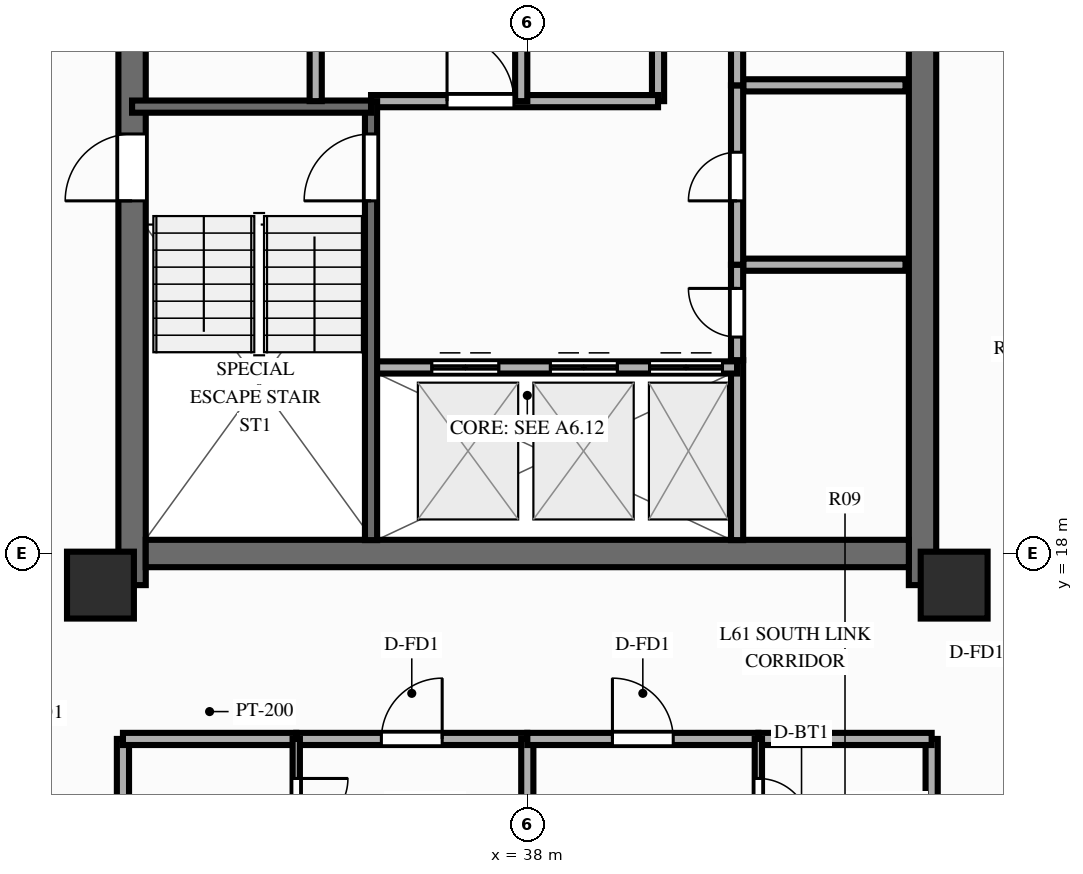
"""IFC4 building model, lengths in metres.
Left out: names, types, materials, properties, quantities, classifications, styles, units other than length and angle.
Written with IfcOpenShell. Run it as: python <this file> out.ifc"""

import sys

from ifc_helpers import new_model, si_unit, direction, frame, frame_2d, origin, origin_2d, place, context, subcontext, project, spatial, rectangle, extrude, source, transform, mapped, element, fill, save


model = new_model("IFC4")
c1 = context("Model", 3, precision=1e-05, world=origin(), true_north=direction((0.0, 1.0)))
c2 = subcontext(c1, "Body", "Model", "MODEL_VIEW")
j1 = project(units=[si_unit("LENGTHUNIT", "METRE"), si_unit("PLANEANGLEUNIT", "RADIAN")], contexts=[c1])
p1 = place(None, origin())
s1 = spatial("IfcSite", under=j1, at=p1, CompositionType="ELEMENT")
p2 = place(p1, origin())
s2 = spatial("IfcBuilding", under=s1, at=p2, CompositionType="ELEMENT")
p3 = place(p2, frame((0.0, 0.0, 196.6)))
s3 = spatial("IfcBuildingStorey", under=s2, at=p3, CompositionType="ELEMENT", Elevation=196.6)
p4 = place(p3, frame((31.5, 17.48, 0.0), z_axis=(0.0, 0.0, 1.0), x_axis=(0.0, 1.0, 0.0)))
e1 = element("IfcWall", 1, at=p4, inside=s3, PredefinedType="SHEAR", context=c2, shape_type="SweptSolid", body=[
    extrude(rectangle(XDim=19.04, YDim=0.45, at=frame_2d((9.52, 0.0))), origin(), (0.0, 0.0, 1.0), 3.0),
])
p5 = place(p4, frame((6.32, 0.0, 0.0)))
e2 = element("IfcOpeningElement", 2, at=p5, cuts=e1, PredefinedType="OPENING", context=c2, shape_type="SweptSolid", body=[
    extrude(rectangle(XDim=1.1, YDim=2.15, at=frame_2d((0.55, 1.075))), frame((0.0, 0.237, 0.0), z_axis=(0.0, -1.0, 0.0), x_axis=(1.0, 0.0, 0.0)), (0.0, 0.0, 1.0), 0.474),
])
p6 = place(p3, frame((44.5, 17.48, 0.0), z_axis=(0.0, 0.0, 1.0), x_axis=(0.0, 1.0, 0.0)))
e3 = element("IfcWall", 3, at=p6, inside=s3, PredefinedType="SHEAR", context=c2, shape_type="SweptSolid", body=[
    extrude(rectangle(XDim=19.04, YDim=0.45, at=frame_2d((9.52, 0.0))), origin(), (0.0, 0.0, 1.0), 3.0),
])
p7 = place(p6, frame((12.67, 0.0, 0.0), z_axis=(0.0, 0.0, 1.0), x_axis=(-1.0, 0.0, 0.0)))
e4 = element("IfcOpeningElement", 4, at=p7, cuts=e3, PredefinedType="OPENING", context=c2, shape_type="SweptSolid", body=[
    extrude(rectangle(XDim=1.1, YDim=2.15, at=frame_2d((0.55, 1.075))), frame((0.0, 0.237, 0.0), z_axis=(0.0, -1.0, 0.0), x_axis=(1.0, 0.0, 0.0)), (0.0, 0.0, 1.0), 0.474),
])
p8 = place(p3, frame((31.725, 18.0, 0.0), z_axis=(0.0, 0.0, 1.0), x_axis=(1.0, 0.0, 0.0)))
e5 = element("IfcWall", 5, at=p8, inside=s3, PredefinedType="SHEAR", context=c2, shape_type="SweptSolid", body=[
    extrude(rectangle(XDim=12.55, YDim=0.45, at=frame_2d((6.275, 0.0))), origin(), (0.0, 0.0, 1.0), 3.0),
])
m1 = source(origin(), c2, "Body", "SweptSolid", [
    extrude(rectangle(XDim=1.1, YDim=1.1, at=origin_2d()), origin(), (0.0, 0.0, 1.0), 3.0),
])
for number, where, z_axis, x_axis in (
    (6, (30.98, 17.48, 0.0), (0.0, 0.0, 1.0), (1.0, 0.0, 0.0)),
    (7, (45.02, 17.48, 0.0), (0.0, 0.0, 1.0), (1.0, 0.0, 0.0)),
):
    element("IfcColumn", number, at=place(p3, frame(where, z_axis=z_axis, x_axis=x_axis)), inside=s3, PredefinedType="COLUMN", context=c2, shape_type="MappedRepresentation", body=[
        mapped(m1, transform((0.0, 0.0, 0.0), scale=1.0)),
    ])
p9 = place(p3, frame((41.55, 22.75, 0.0), z_axis=(0.0, 0.0, 1.0), x_axis=(1.0, 0.0, 0.0)))
e8 = element("IfcWall", 8, at=p9, inside=s3, PredefinedType="PARTITIONING", context=c2, shape_type="SweptSolid", body=[
    extrude(rectangle(XDim=2.67, YDim=0.2, at=frame_2d((1.335, 0.0))), origin(), (0.0, 0.0, 1.0), 2.79),
])
p10 = place(p3, frame((41.55, 25.7, 0.0), z_axis=(0.0, 0.0, 1.0), x_axis=(1.0, 0.0, 0.0)))
e9 = element("IfcWall", 9, at=p10, inside=s3, PredefinedType="PARTITIONING", context=c2, shape_type="SweptSolid", body=[
    extrude(rectangle(XDim=2.67, YDim=0.2, at=frame_2d((1.335, 0.0))), origin(), (0.0, 0.0, 1.0), 2.14),
])
p11 = place(p3, frame((41.45, 18.22, 0.0), z_axis=(0.0, 0.0, 1.0), x_axis=(0.0, 1.0, 0.0)))
e10 = element("IfcWall", 10, at=p11, inside=s3, PredefinedType="PARTITIONING", context=c2, shape_type="SweptSolid", body=[
    extrude(rectangle(XDim=2.96, YDim=0.2, at=frame_2d((1.48, 0.0))), origin(), (0.0, 0.0, 1.0), 2.79),
])
p12 = place(p3, frame((41.45, 21.18, 0.0), z_axis=(0.0, 0.0, 1.0), x_axis=(0.0, 1.0, 0.0)))
e11 = element("IfcWall", 11, at=p12, inside=s3, PredefinedType="PARTITIONING", context=c2, shape_type="SweptSolid", body=[
    extrude(rectangle(XDim=1.57, YDim=0.2, at=frame_2d((0.785, 0.0))), origin(), (0.0, 0.0, 1.0), 2.79),
])
p13 = place(p12, frame((0.38, 0.0, 0.0)))
e12 = element("IfcOpeningElement", 12, at=p13, cuts=e11, PredefinedType="OPENING", context=c2, shape_type="SweptSolid", body=[
    extrude(rectangle(XDim=0.8, YDim=2.05, at=frame_2d((0.4, 1.025))), frame((0.0, 0.112, 0.0), z_axis=(0.0, -1.0, 0.0), x_axis=(1.0, 0.0, 0.0)), (0.0, 0.0, 1.0), 0.224),
])
p14 = place(p3, frame((41.45, 22.75, 0.0), z_axis=(0.0, 0.0, 1.0), x_axis=(0.0, 1.0, 0.0)))
e13 = element("IfcWall", 13, at=p14, inside=s3, PredefinedType="PARTITIONING", context=c2, shape_type="SweptSolid", body=[
    extrude(rectangle(XDim=2.95, YDim=0.2, at=frame_2d((1.475, 0.0))), origin(), (0.0, 0.0, 1.0), 2.79),
])
p15 = place(p14, frame((1.05, 0.0, 0.0)))
e14 = element("IfcOpeningElement", 14, at=p15, cuts=e13, PredefinedType="OPENING", context=c2, shape_type="SweptSolid", body=[
    extrude(rectangle(XDim=0.8, YDim=2.05, at=frame_2d((0.4, 1.025))), frame((0.0, 0.112, 0.0), z_axis=(0.0, -1.0, 0.0), x_axis=(1.0, 0.0, 0.0)), (0.0, 0.0, 1.0), 0.224),
])
p16 = place(p3, frame((41.45, 25.7, 0.0), z_axis=(0.0, 0.0, 1.0), x_axis=(0.0, 1.0, 0.0)))
e15 = element("IfcWall", 15, at=p16, inside=s3, PredefinedType="PARTITIONING", context=c2, shape_type="SweptSolid", body=[
    extrude(rectangle(XDim=2.9, YDim=0.2, at=frame_2d((1.45, 0.0))), origin(), (0.0, 0.0, 1.0), 2.79),
])
p17 = place(p16, frame((1.0, 0.0, 0.0)))
e16 = element("IfcOpeningElement", 16, at=p17, cuts=e15, PredefinedType="OPENING", context=c2, shape_type="SweptSolid", body=[
    extrude(rectangle(XDim=0.9, YDim=2.1, at=frame_2d((0.45, 1.05))), frame((0.0, 0.112, 0.0), z_axis=(0.0, -1.0, 0.0), x_axis=(1.0, 0.0, 0.0)), (0.0, 0.0, 1.0), 0.224),
])
p18 = place(p3, frame((40.15, 25.44, 0.0), z_axis=(0.0, 0.0, 1.0), x_axis=(0.0, 1.0, 0.0)))
e17 = element("IfcWall", 17, at=p18, inside=s3, PredefinedType="PARTITIONING", context=c2, shape_type="SweptSolid", body=[
    extrude(rectangle(XDim=6.36, YDim=0.2, at=frame_2d((3.18, 0.0))), origin(), (0.0, 0.0, 1.0), 2.79),
])
p19 = place(p3, frame((35.43, 21.06, 0.0), z_axis=(0.0, 0.0, 1.0), x_axis=(1.0, 0.0, 0.0)))
e18 = element("IfcWall", 18, at=p19, inside=s3, PredefinedType="PARTITIONING", context=c2, shape_type="SweptSolid", body=[
    extrude(rectangle(XDim=6.02, YDim=0.2, at=frame_2d((3.01, 0.0))), origin(), (0.0, 0.0, 1.0), 2.79),
])
p20 = place(p19, frame((1.0, 0.0, 0.0)))
e19 = element("IfcOpeningElement", 19, at=p20, cuts=e18, PredefinedType="OPENING", context=c2, shape_type="SweptSolid", body=[
    extrude(rectangle(XDim=1.1, YDim=2.15, at=frame_2d((0.55, 1.075))), frame((0.0, 0.112, 0.0), z_axis=(0.0, -1.0, 0.0), x_axis=(1.0, 0.0, 0.0)), (0.0, 0.0, 1.0), 0.224),
])
p21 = place(p19, frame((2.95, 0.0, 0.0)))
e20 = element("IfcOpeningElement", 20, at=p21, cuts=e18, PredefinedType="OPENING", context=c2, shape_type="SweptSolid", body=[
    extrude(rectangle(XDim=1.1, YDim=2.15, at=frame_2d((0.55, 1.075))), frame((0.0, 0.112, 0.0), z_axis=(0.0, -1.0, 0.0), x_axis=(1.0, 0.0, 0.0)), (0.0, 0.0, 1.0), 0.224),
])
p22 = place(p19, frame((4.58, 0.0, 0.0)))
e21 = element("IfcOpeningElement", 21, at=p22, cuts=e18, PredefinedType="OPENING", context=c2, shape_type="SweptSolid", body=[
    extrude(rectangle(XDim=1.2, YDim=2.15, at=frame_2d((0.6, 1.075))), frame((0.0, 0.112, 0.0), z_axis=(0.0, -1.0, 0.0), x_axis=(1.0, 0.0, 0.0)), (0.0, 0.0, 1.0), 0.224),
])
p23 = place(p3, frame((35.43, 25.44, 0.0), z_axis=(0.0, 0.0, 1.0), x_axis=(1.0, 0.0, 0.0)))
e22 = element("IfcWall", 22, at=p23, inside=s3, PredefinedType="PARTITIONING", context=c2, shape_type="SweptSolid", body=[
    extrude(rectangle(XDim=4.72, YDim=0.2, at=frame_2d((2.36, 0.0))), origin(), (0.0, 0.0, 1.0), 2.79),
])
p24 = place(p23, frame((1.25, 0.0, 0.0)))
e23 = element("IfcOpeningElement", 23, at=p24, cuts=e22, PredefinedType="OPENING", context=c2, shape_type="SweptSolid", body=[
    extrude(rectangle(XDim=1.1, YDim=2.15, at=frame_2d((0.55, 1.075))), frame((0.0, 0.112, 0.0), z_axis=(0.0, -1.0, 0.0), x_axis=(1.0, 0.0, 0.0)), (0.0, 0.0, 1.0), 0.224),
])
p25 = place(p3, frame((35.43, 18.22, 0.0), z_axis=(0.0, 0.0, 1.0), x_axis=(0.0, 1.0, 0.0)))
e24 = element("IfcWall", 24, at=p25, inside=s3, PredefinedType="SOLIDWALL", context=c2, shape_type="SweptSolid", body=[
    extrude(rectangle(XDim=7.22, YDim=0.2, at=frame_2d((3.61, 0.0))), origin(), (0.0, 0.0, 1.0), 2.79),
])
p26 = place(p25, frame((6.68, 0.0, 0.0), z_axis=(0.0, 0.0, 1.0), x_axis=(-1.0, 0.0, 0.0)))
e25 = element("IfcOpeningElement", 25, at=p26, cuts=e24, PredefinedType="OPENING", context=c2, shape_type="SweptSolid", body=[
    extrude(rectangle(XDim=1.1, YDim=2.15, at=frame_2d((0.55, 1.075))), frame((0.0, 0.112, 0.0), z_axis=(0.0, -1.0, 0.0), x_axis=(1.0, 0.0, 0.0)), (0.0, 0.0, 1.0), 0.224),
])
p27 = place(p3, frame((31.5, 25.35, 0.0), z_axis=(0.0, 0.0, 1.0), x_axis=(1.0, 0.0, 0.0)))
e26 = element("IfcWall", 26, at=p27, inside=s3, PredefinedType="SOLIDWALL", context=c2, shape_type="SweptSolid", body=[
    extrude(rectangle(XDim=3.93, YDim=0.2, at=frame_2d((1.965, 0.0))), origin(), (0.0, 0.0, 1.0), 2.79),
])
p28 = place(p3, frame((34.52, 25.44, 0.0), z_axis=(0.0, 0.0, 1.0), x_axis=(0.0, 1.0, 0.0)))
e27 = element("IfcWall", 27, at=p28, inside=s3, PredefinedType="PARTITIONING", context=c2, shape_type="SweptSolid", body=[
    extrude(rectangle(XDim=10.34, YDim=0.2, at=frame_2d((5.17, 0.0))), origin(), (0.0, 0.0, 1.0), 2.79),
])
p29 = place(p28, frame((1.15, 0.0, 0.0)))
e28 = element("IfcOpeningElement", 28, at=p29, cuts=e27, PredefinedType="OPENING", context=c2, shape_type="SweptSolid", body=[
    extrude(rectangle(XDim=0.9, YDim=2.1, at=frame_2d((0.45, 1.05))), frame((0.0, 0.112, 0.0), z_axis=(0.0, -1.0, 0.0), x_axis=(1.0, 0.0, 0.0)), (0.0, 0.0, 1.0), 0.224),
])
p30 = place(p28, frame((4.35, 0.0, 0.0)))
e29 = element("IfcOpeningElement", 29, at=p30, cuts=e27, PredefinedType="OPENING", context=c2, shape_type="SweptSolid", body=[
    extrude(rectangle(XDim=0.9, YDim=2.1, at=frame_2d((0.45, 1.05))), frame((0.0, 0.112, 0.0), z_axis=(0.0, -1.0, 0.0), x_axis=(1.0, 0.0, 0.0)), (0.0, 0.0, 1.0), 0.224),
])
p31 = place(p28, frame((7.01, 0.0, 0.0)))
e30 = element("IfcOpeningElement", 30, at=p31, cuts=e27, PredefinedType="OPENING", context=c2, shape_type="SweptSolid", body=[
    extrude(rectangle(XDim=1.0, YDim=2.15, at=frame_2d((0.5, 1.075))), frame((0.0, 0.112, 0.0), z_axis=(0.0, -1.0, 0.0), x_axis=(1.0, 0.0, 0.0)), (0.0, 0.0, 1.0), 0.224),
])
p32 = place(p28, frame((8.76, 0.0, 0.0)))
e31 = element("IfcOpeningElement", 31, at=p32, cuts=e27, PredefinedType="OPENING", context=c2, shape_type="SweptSolid", body=[
    extrude(rectangle(XDim=1.0, YDim=2.15, at=frame_2d((0.5, 1.075))), frame((0.0, 0.112, 0.0), z_axis=(0.0, -1.0, 0.0), x_axis=(1.0, 0.0, 0.0)), (0.0, 0.0, 1.0), 0.224),
])
p33 = place(p3, frame((37.9, 25.44, 0.0), z_axis=(0.0, 0.0, 1.0), x_axis=(0.0, 1.0, 0.0)))
e32 = element("IfcWall", 32, at=p33, inside=s3, PredefinedType="PARTITIONING", context=c2, shape_type="SweptSolid", body=[
    extrude(rectangle(XDim=10.34, YDim=0.2, at=frame_2d((5.17, 0.0))), origin(), (0.0, 0.0, 1.0), 2.79),
])
p34 = place(p33, frame((2.6, 0.0, 0.0)))
e33 = element("IfcOpeningElement", 33, at=p34, cuts=e32, PredefinedType="OPENING", context=c2, shape_type="SweptSolid", body=[
    extrude(rectangle(XDim=0.9, YDim=2.1, at=frame_2d((0.45, 1.05))), frame((0.0, 0.112, 0.0), z_axis=(0.0, -1.0, 0.0), x_axis=(1.0, 0.0, 0.0)), (0.0, 0.0, 1.0), 0.224),
])
p35 = place(p33, frame((6.86, 0.0, 0.0)))
e34 = element("IfcOpeningElement", 34, at=p35, cuts=e32, PredefinedType="OPENING", context=c2, shape_type="SweptSolid", body=[
    extrude(rectangle(XDim=1.0, YDim=2.15, at=frame_2d((0.5, 1.075))), frame((0.0, 0.112, 0.0), z_axis=(0.0, -1.0, 0.0), x_axis=(1.0, 0.0, 0.0)), (0.0, 0.0, 1.0), 0.224),
])
p36 = place(p33, frame((8.71, 0.0, 0.0)))
e35 = element("IfcOpeningElement", 35, at=p36, cuts=e32, PredefinedType="OPENING", context=c2, shape_type="SweptSolid", body=[
    extrude(rectangle(XDim=1.0, YDim=2.15, at=frame_2d((0.5, 1.075))), frame((0.0, 0.112, 0.0), z_axis=(0.0, -1.0, 0.0), x_axis=(1.0, 0.0, 0.0)), (0.0, 0.0, 1.0), 0.224),
])
for number, where, z_axis, x_axis in (
    (36, (31.35, 14.95, 0.0), (0.0, 0.0, 1.0), (0.0, -1.0, 0.0)),
    (37, (44.65, 14.95, 0.0), (0.0, 0.0, 1.0), (0.0, -1.0, 0.0)),
):
    element("IfcWall", number, at=place(p3, frame(where, z_axis=z_axis, x_axis=x_axis)), inside=s3, PredefinedType="PARTITIONING", context=c2, shape_type="SweptSolid", body=[
        extrude(rectangle(XDim=8.8, YDim=0.2, at=frame_2d((4.4, 0.0))), origin(), (0.0, 0.0, 1.0), 2.39),
    ])
p37 = place(p3, frame((31.35, 14.95, 0.0), z_axis=(0.0, 0.0, 1.0), x_axis=(1.0, 0.0, 0.0)))
e38 = element("IfcWall", 38, at=p37, inside=s3, PredefinedType="PARTITIONING", context=c2, shape_type="SweptSolid", body=[
    extrude(rectangle(XDim=2.85, YDim=0.2, at=frame_2d((1.425, 0.0))), origin(), (0.0, 0.0, 1.0), 2.79),
])
p38 = place(p3, frame((34.2, 14.95, 0.0), z_axis=(0.0, 0.0, 1.0), x_axis=(1.0, 0.0, 0.0)))
e39 = element("IfcWall", 39, at=p38, inside=s3, PredefinedType="PARTITIONING", context=c2, shape_type="SweptSolid", body=[
    extrude(rectangle(XDim=3.8, YDim=0.2, at=frame_2d((1.9, 0.0))), origin(), (0.0, 0.0, 1.0), 2.79),
])
p39 = place(p38, frame((1.4, 0.0, 0.0)))
e40 = element("IfcOpeningElement", 40, at=p39, cuts=e39, PredefinedType="OPENING", context=c2, shape_type="SweptSolid", body=[
    extrude(rectangle(XDim=1.0, YDim=2.15, at=frame_2d((0.5, 1.075))), frame((0.0, 0.112, 0.0), z_axis=(0.0, -1.0, 0.0), x_axis=(1.0, 0.0, 0.0)), (0.0, 0.0, 1.0), 0.224),
])
p40 = place(p3, frame((34.2, 14.95, 0.0), z_axis=(0.0, 0.0, 1.0), x_axis=(0.0, -1.0, 0.0)))
e41 = element("IfcWall", 41, at=p40, inside=s3, PredefinedType="PARTITIONING", context=c2, shape_type="SweptSolid", body=[
    extrude(rectangle(XDim=2.15, YDim=0.12, at=frame_2d((1.075, 0.0))), origin(), (0.0, 0.0, 1.0), 2.79),
])
p41 = place(p40, frame((0.65, 0.0, 0.0)))
e42 = element("IfcOpeningElement", 42, at=p41, cuts=e41, PredefinedType="OPENING", context=c2, shape_type="SweptSolid", body=[
    extrude(rectangle(XDim=0.85, YDim=2.05, at=frame_2d((0.425, 1.025))), frame((0.0, 0.072, 0.0), z_axis=(0.0, -1.0, 0.0), x_axis=(1.0, 0.0, 0.0)), (0.0, 0.0, 1.0), 0.144),
])
p42 = place(p3, frame((38.0, 14.95, 0.0), z_axis=(0.0, 0.0, 1.0), x_axis=(0.0, -1.0, 0.0)))
e43 = element("IfcWall", 43, at=p42, inside=s3, PredefinedType="PARTITIONING", context=c2, shape_type="SweptSolid", body=[
    extrude(rectangle(XDim=8.8, YDim=0.2, at=frame_2d((4.4, 0.0))), origin(), (0.0, 0.0, 1.0), 2.79),
])
p43 = place(p3, frame((38.0, 14.95, 0.0), z_axis=(0.0, 0.0, 1.0), x_axis=(1.0, 0.0, 0.0)))
e44 = element("IfcWall", 44, at=p43, inside=s3, PredefinedType="PARTITIONING", context=c2, shape_type="SweptSolid", body=[
    extrude(rectangle(XDim=3.8, YDim=0.2, at=frame_2d((1.9, 0.0))), origin(), (0.0, 0.0, 1.0), 2.79),
])
p44 = place(p43, frame((1.4, 0.0, 0.0)))
e45 = element("IfcOpeningElement", 45, at=p44, cuts=e44, PredefinedType="OPENING", context=c2, shape_type="SweptSolid", body=[
    extrude(rectangle(XDim=1.0, YDim=2.15, at=frame_2d((0.5, 1.075))), frame((0.0, 0.112, 0.0), z_axis=(0.0, -1.0, 0.0), x_axis=(1.0, 0.0, 0.0)), (0.0, 0.0, 1.0), 0.224),
])
p45 = place(p3, frame((41.8, 14.95, 0.0), z_axis=(0.0, 0.0, 1.0), x_axis=(1.0, 0.0, 0.0)))
e46 = element("IfcWall", 46, at=p45, inside=s3, PredefinedType="PARTITIONING", context=c2, shape_type="SweptSolid", body=[
    extrude(rectangle(XDim=2.85, YDim=0.2, at=frame_2d((1.425, 0.0))), origin(), (0.0, 0.0, 1.0), 2.79),
])
p46 = place(p3, frame((41.8, 14.95, 0.0), z_axis=(0.0, 0.0, 1.0), x_axis=(0.0, -1.0, 0.0)))
e47 = element("IfcWall", 47, at=p46, inside=s3, PredefinedType="PARTITIONING", context=c2, shape_type="SweptSolid", body=[
    extrude(rectangle(XDim=2.15, YDim=0.12, at=frame_2d((1.075, 0.0))), origin(), (0.0, 0.0, 1.0), 2.79),
])
p47 = place(p46, frame((0.65, 0.0, 0.0)))
e48 = element("IfcOpeningElement", 48, at=p47, cuts=e47, PredefinedType="OPENING", context=c2, shape_type="SweptSolid", body=[
    extrude(rectangle(XDim=0.85, YDim=2.05, at=frame_2d((0.425, 1.025))), frame((0.0, 0.072, 0.0), z_axis=(0.0, -1.0, 0.0), x_axis=(1.0, 0.0, 0.0)), (0.0, 0.0, 1.0), 0.144),
])
m2 = source(origin(), c2, "Body", "SweptSolid", [
    extrude(rectangle(XDim=1.1, YDim=2.15, at=frame_2d((0.55, 1.075))), frame((0.0, 0.025, 0.0), z_axis=(0.0, -1.0, 0.0), x_axis=(1.0, 0.0, 0.0)), (0.0, 0.0, 1.0), 0.05),
])
p48 = place(p5, origin())
e49 = element("IfcDoor", 49, at=p48, inside=s3, OperationType="SINGLE_SWING_LEFT", PredefinedType="DOOR", context=c2, shape_type="MappedRepresentation", body=[
    mapped(m2, transform((0.0, 0.0, 0.0), scale=1.0)),
])
fill(e2, e49)
m3 = source(origin(), c2, "Body", "SweptSolid", [
    extrude(rectangle(XDim=0.8, YDim=2.05, at=frame_2d((0.4, 1.025))), frame((0.0, 0.025, 0.0), z_axis=(0.0, -1.0, 0.0), x_axis=(1.0, 0.0, 0.0)), (0.0, 0.0, 1.0), 0.05),
])
p49 = place(p13, origin())
e50 = element("IfcDoor", 50, at=p49, inside=s3, OperationType="SINGLE_SWING_RIGHT", PredefinedType="DOOR", context=c2, shape_type="MappedRepresentation", body=[
    mapped(m3, transform((0.0, 0.0, 0.0), scale=1.0)),
])
fill(e12, e50)
p50 = place(p15, origin())
e51 = element("IfcDoor", 51, at=p50, inside=s3, OperationType="SINGLE_SWING_LEFT", PredefinedType="DOOR", context=c2, shape_type="MappedRepresentation", body=[
    mapped(m3, transform((0.0, 0.0, 0.0), scale=1.0)),
])
fill(e14, e51)
p51 = place(p20, origin())
e52 = element("IfcDoor", 52, at=p51, inside=s3, OperationType="DOUBLE_DOOR_SLIDING", PredefinedType="DOOR", context=c2, shape_type="MappedRepresentation", body=[
    mapped(m2, transform((0.0, 0.0, 0.0), scale=1.0)),
])
fill(e19, e52)
p52 = place(p21, origin())
e53 = element("IfcDoor", 53, at=p52, inside=s3, OperationType="DOUBLE_DOOR_SLIDING", PredefinedType="DOOR", context=c2, shape_type="MappedRepresentation", body=[
    mapped(m2, transform((0.0, 0.0, 0.0), scale=1.0)),
])
fill(e20, e53)
m4 = source(origin(), c2, "Body", "SweptSolid", [
    extrude(rectangle(XDim=1.2, YDim=2.15, at=frame_2d((0.6, 1.075))), frame((0.0, 0.025, 0.0), z_axis=(0.0, -1.0, 0.0), x_axis=(1.0, 0.0, 0.0)), (0.0, 0.0, 1.0), 0.05),
])
p53 = place(p22, origin())
e54 = element("IfcDoor", 54, at=p53, inside=s3, OperationType="DOUBLE_DOOR_SLIDING", PredefinedType="DOOR", context=c2, shape_type="MappedRepresentation", body=[
    mapped(m4, transform((0.0, 0.0, 0.0), scale=1.0)),
])
fill(e21, e54)
p54 = place(p24, origin())
e55 = element("IfcDoor", 55, at=p54, inside=s3, OperationType="SINGLE_SWING_LEFT", PredefinedType="DOOR", context=c2, shape_type="MappedRepresentation", body=[
    mapped(m2, transform((0.0, 0.0, 0.0), scale=1.0)),
])
fill(e23, e55)
p55 = place(p26, origin())
e56 = element("IfcDoor", 56, at=p55, inside=s3, OperationType="SINGLE_SWING_RIGHT", PredefinedType="DOOR", context=c2, shape_type="MappedRepresentation", body=[
    mapped(m2, transform((0.0, 0.0, 0.0), scale=1.0)),
])
fill(e25, e56)
m5 = source(origin(), c2, "Body", "SweptSolid", [
    extrude(rectangle(XDim=1.0, YDim=2.15, at=frame_2d((0.5, 1.075))), frame((0.0, 0.025, 0.0), z_axis=(0.0, -1.0, 0.0), x_axis=(1.0, 0.0, 0.0)), (0.0, 0.0, 1.0), 0.05),
])
p56 = place(p39, origin())
e57 = element("IfcDoor", 57, at=p56, inside=s3, OperationType="SINGLE_SWING_RIGHT", PredefinedType="DOOR", context=c2, shape_type="MappedRepresentation", body=[
    mapped(m5, transform((0.0, 0.0, 0.0), scale=1.0)),
])
fill(e40, e57)
m6 = source(origin(), c2, "Body", "SweptSolid", [
    extrude(rectangle(XDim=0.85, YDim=2.05, at=frame_2d((0.425, 1.025))), frame((0.0, 0.025, 0.0), z_axis=(0.0, -1.0, 0.0), x_axis=(1.0, 0.0, 0.0)), (0.0, 0.0, 1.0), 0.05),
])
p57 = place(p41, origin())
e58 = element("IfcDoor", 58, at=p57, inside=s3, OperationType="SINGLE_SWING_LEFT", PredefinedType="DOOR", context=c2, shape_type="MappedRepresentation", body=[
    mapped(m6, transform((0.0, 0.0, 0.0), scale=1.0)),
])
fill(e42, e58)
p58 = place(p44, origin())
e59 = element("IfcDoor", 59, at=p58, inside=s3, OperationType="SINGLE_SWING_LEFT", PredefinedType="DOOR", context=c2, shape_type="MappedRepresentation", body=[
    mapped(m5, transform((0.0, 0.0, 0.0), scale=1.0)),
])
fill(e45, e59)
p59 = place(p47, origin())
e60 = element("IfcDoor", 60, at=p59, inside=s3, OperationType="SINGLE_SWING_RIGHT", PredefinedType="DOOR", context=c2, shape_type="MappedRepresentation", body=[
    mapped(m6, transform((0.0, 0.0, 0.0), scale=1.0)),
])
fill(e48, e60)
save(model, sys.argv[1])
